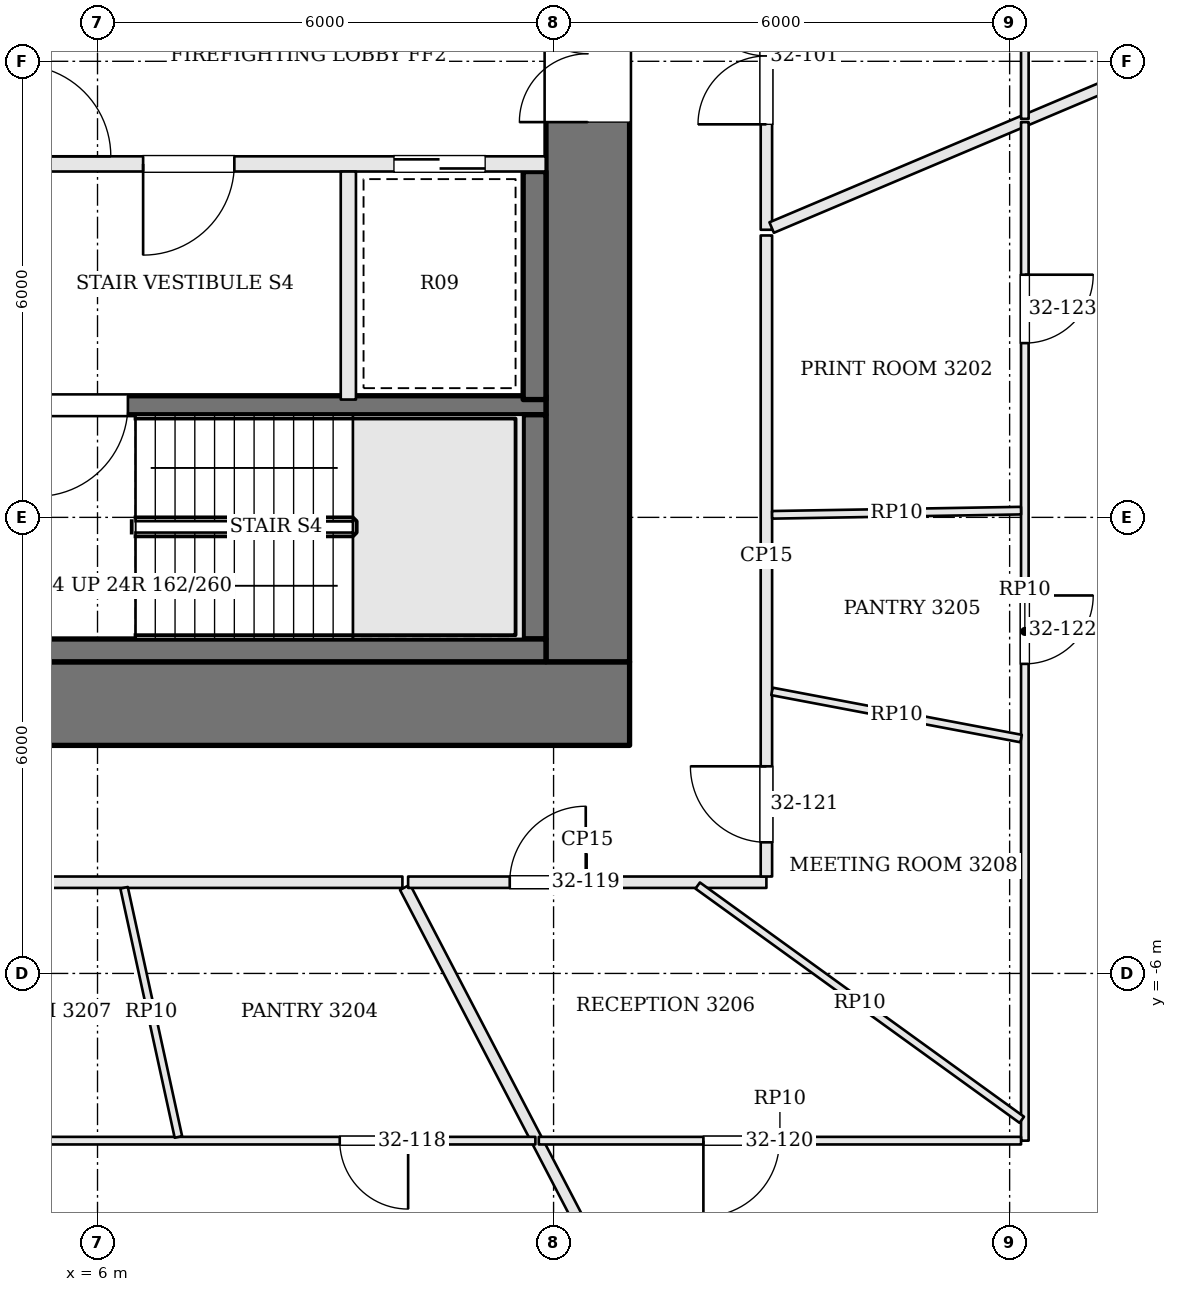
"""IFC4 building model, lengths in metres.
Left out: names, types, materials, properties, quantities, classifications, styles, units other than length and angle.
Written with IfcOpenShell. Run it as: python <this file> out.ifc"""

import sys

from ifc_helpers import new_model, si_unit, direction, frame, frame_2d, origin, place, context, subcontext, project, spatial, rectangle, extrude, element, fill, save


model = new_model("IFC4")
c1 = context("Model", 3, precision=1e-05, world=origin(), true_north=direction((0.0, 1.0)))
c2 = subcontext(c1, "Body", "Model", "MODEL_VIEW")
j1 = project(units=[si_unit("LENGTHUNIT", "METRE"), si_unit("PLANEANGLEUNIT", "RADIAN")], contexts=[c1])
p1 = place(None, origin())
s1 = spatial("IfcSite", under=j1, at=p1, CompositionType="ELEMENT")
p2 = place(p1, origin())
s2 = spatial("IfcBuilding", under=s1, at=p2, CompositionType="ELEMENT")
p3 = place(p2, frame((0.0, 0.0, 134.4)))
s3 = spatial("IfcBuildingStorey", under=s2, at=p3, CompositionType="ELEMENT", Elevation=134.4)
p4 = place(p3, frame((-13.0, -2.45, 0.0), z_axis=(0.0, 0.0, 1.0), x_axis=(1.0, 0.0, 0.0)))
e1 = element("IfcWall", 1, at=p4, inside=s3, PredefinedType="SHEAR", context=c2, shape_type="SweptSolid", body=[
    extrude(rectangle(XDim=26.0, YDim=1.1, at=frame_2d((13.0, 0.0))), origin(), (0.0, 0.0, 1.0), 3.9),
])
p5 = place(p4, frame((9.275, 0.0, 0.0)))
e2 = element("IfcOpeningElement", 2, at=p5, cuts=e1, PredefinedType="OPENING", context=c2, shape_type="SweptSolid", body=[
    extrude(rectangle(XDim=0.9, YDim=2.1, at=frame_2d((0.45, 1.05))), frame((0.0, 0.56, 0.0), z_axis=(0.0, -1.0, 0.0), x_axis=(1.0, 0.0, 0.0)), (0.0, 0.0, 1.0), 1.12),
])
p6 = place(p4, frame((11.75, 0.0, 0.0)))
e3 = element("IfcOpeningElement", 3, at=p6, cuts=e1, PredefinedType="OPENING", context=c2, shape_type="SweptSolid", body=[
    extrude(rectangle(XDim=1.0, YDim=2.1, at=frame_2d((0.5, 1.05))), frame((0.0, 0.56, 0.0), z_axis=(0.0, -1.0, 0.0), x_axis=(1.0, 0.0, 0.0)), (0.0, 0.0, 1.0), 1.12),
])
p7 = place(p4, frame((14.325, 0.0, 0.0)))
e4 = element("IfcOpeningElement", 4, at=p7, cuts=e1, PredefinedType="OPENING", context=c2, shape_type="SweptSolid", body=[
    extrude(rectangle(XDim=0.9, YDim=2.1, at=frame_2d((0.45, 1.05))), frame((0.0, 0.56, 0.0), z_axis=(0.0, -1.0, 0.0), x_axis=(1.0, 0.0, 0.0)), (0.0, 0.0, 1.0), 1.12),
])
p8 = place(p4, frame((16.7, 0.0, 0.0)))
e5 = element("IfcOpeningElement", 5, at=p8, cuts=e1, PredefinedType="OPENING", context=c2, shape_type="SweptSolid", body=[
    extrude(rectangle(XDim=0.9, YDim=2.1, at=frame_2d((0.45, 1.05))), frame((0.0, 0.56, 0.0), z_axis=(0.0, -1.0, 0.0), x_axis=(1.0, 0.0, 0.0)), (0.0, 0.0, 1.0), 1.12),
])
p9 = place(p3, frame((12.45, -1.9, 0.0), z_axis=(0.0, 0.0, 1.0), x_axis=(0.0, 1.0, 0.0)))
e6 = element("IfcWall", 6, at=p9, inside=s3, PredefinedType="SHEAR", context=c2, shape_type="SweptSolid", body=[
    extrude(rectangle(XDim=12.8, YDim=1.1, at=frame_2d((6.4, 0.0))), origin(), (0.0, 0.0, 1.0), 3.9),
])
p10 = place(p9, frame((7.1, 0.0, 0.0)))
e7 = element("IfcOpeningElement", 7, at=p10, cuts=e6, PredefinedType="OPENING", context=c2, shape_type="SweptSolid", body=[
    extrude(rectangle(XDim=1.8, YDim=2.1, at=frame_2d((0.9, 1.05))), frame((0.0, 0.56, 0.0), z_axis=(0.0, -1.0, 0.0), x_axis=(1.0, 0.0, 0.0)), (0.0, 0.0, 1.0), 1.12),
])
p11 = place(p3, frame((11.9, 4.65, 0.0), z_axis=(0.0, 0.0, 1.0), x_axis=(-1.0, 0.0, 0.0)))
e8 = element("IfcWall", 8, at=p11, inside=s3, PredefinedType="SOLIDWALL", context=c2, shape_type="SweptSolid", body=[
    extrude(rectangle(XDim=6.8, YDim=0.2, at=frame_2d((3.4, 0.0))), origin(), (0.0, 0.0, 1.0), 3.7),
])
p12 = place(p11, frame((4.1, 0.0, 0.0)))
e9 = element("IfcOpeningElement", 9, at=p12, cuts=e8, PredefinedType="OPENING", context=c2, shape_type="SweptSolid", body=[
    extrude(rectangle(XDim=1.2, YDim=2.1, at=frame_2d((0.6, 1.05))), frame((0.0, 0.11, 0.0), z_axis=(0.0, -1.0, 0.0), x_axis=(1.0, 0.0, 0.0)), (0.0, 0.0, 1.0), 0.22),
])
p13 = place(p11, frame((0.8, 0.0, 0.0)))
e10 = element("IfcOpeningElement", 10, at=p13, cuts=e8, PredefinedType="OPENING", context=c2, shape_type="SweptSolid", body=[
    extrude(rectangle(XDim=1.2, YDim=2.1, at=frame_2d((0.6, 1.05))), frame((0.0, 0.11, 0.0), z_axis=(0.0, -1.0, 0.0), x_axis=(1.0, 0.0, 0.0)), (0.0, 0.0, 1.0), 0.22),
])
p14 = place(p3, frame((11.9, 1.475, 0.0), z_axis=(0.0, 0.0, 1.0), x_axis=(-1.0, 0.0, 0.0)))
e11 = element("IfcWall", 11, at=p14, inside=s3, PredefinedType="SOLIDWALL", context=c2, shape_type="SweptSolid", body=[
    extrude(rectangle(XDim=6.8, YDim=0.25, at=frame_2d((3.4, 0.0))), origin(), (0.0, 0.0, 1.0), 3.7),
])
p15 = place(p14, frame((5.5, 0.0, 0.0)))
e12 = element("IfcOpeningElement", 12, at=p15, cuts=e11, PredefinedType="OPENING", context=c2, shape_type="SweptSolid", body=[
    extrude(rectangle(XDim=1.2, YDim=2.1, at=frame_2d((0.6, 1.05))), frame((0.0, 0.135, 0.0), z_axis=(0.0, -1.0, 0.0), x_axis=(1.0, 0.0, 0.0)), (0.0, 0.0, 1.0), 0.27),
])
p16 = place(p3, frame((9.3, 4.55, 0.0), z_axis=(0.0, 0.0, 1.0), x_axis=(0.0, -1.0, 0.0)))
e13 = element("IfcWall", 13, at=p16, inside=s3, PredefinedType="SOLIDWALL", context=c2, shape_type="SweptSolid", body=[
    extrude(rectangle(XDim=3.0, YDim=0.2, at=frame_2d((1.5, 0.0))), origin(), (0.0, 0.0, 1.0), 3.7),
])
p17 = place(p3, frame((11.75, 4.55, 0.0), z_axis=(0.0, 0.0, 1.0), x_axis=(0.0, -1.0, 0.0)))
e14 = element("IfcWall", 14, at=p17, inside=s3, PredefinedType="SOLIDWALL", context=c2, shape_type="SweptSolid", body=[
    extrude(rectangle(XDim=3.0, YDim=0.3, at=frame_2d((1.5, 0.0))), origin(), (0.0, 0.0, 1.0), 3.7),
])
p18 = place(p3, frame((11.75, 1.35, 0.0), z_axis=(0.0, 0.0, 1.0), x_axis=(0.0, -1.0, 0.0)))
e15 = element("IfcWall", 15, at=p18, inside=s3, PredefinedType="SOLIDWALL", context=c2, shape_type="SweptSolid", body=[
    extrude(rectangle(XDim=2.95, YDim=0.3, at=frame_2d((1.475, 0.0))), origin(), (0.0, 0.0, 1.0), 3.7),
])
p19 = place(p3, frame((11.9, -1.75, 0.0), z_axis=(0.0, 0.0, 1.0), x_axis=(-1.0, 0.0, 0.0)))
e16 = element("IfcWall", 16, at=p19, inside=s3, PredefinedType="SOLIDWALL", context=c2, shape_type="SweptSolid", body=[
    extrude(rectangle(XDim=6.8, YDim=0.3, at=frame_2d((3.4, 0.0))), origin(), (0.0, 0.0, 1.0), 3.7),
])
p20 = place(p3, frame((14.8, 3.784, 0.0), z_axis=(0.0, 0.0, 1.0), x_axis=(0.0, 1.0, 0.0)))
e17 = element("IfcWall", 17, at=p20, inside=s3, PredefinedType="PARTITIONING", context=c2, shape_type="SweptSolid", body=[
    extrude(rectangle(XDim=10.943, YDim=0.15, at=frame_2d((5.472, 0.0))), origin(), (0.0, 0.0, 1.0), 3.198),
])
p21 = place(p20, frame((1.387, 0.0, 0.0)))
e18 = element("IfcOpeningElement", 18, at=p21, cuts=e17, PredefinedType="OPENING", context=c2, shape_type="SweptSolid", body=[
    extrude(rectangle(XDim=1.8, YDim=2.1, at=frame_2d((0.9, 1.05))), frame((0.0, 0.085, 0.0), z_axis=(0.0, -1.0, 0.0), x_axis=(1.0, 0.0, 0.0)), (0.0, 0.0, 1.0), 0.17),
])
p22 = place(p20, frame((7.199, 0.0, 0.0)))
e19 = element("IfcOpeningElement", 19, at=p22, cuts=e17, PredefinedType="OPENING", context=c2, shape_type="SweptSolid", body=[
    extrude(rectangle(XDim=1.0, YDim=2.4, at=frame_2d((0.5, 1.2))), frame((0.0, 0.085, 0.0), z_axis=(0.0, -1.0, 0.0), x_axis=(1.0, 0.0, 0.0)), (0.0, 0.0, 1.0), 0.17),
])
p23 = place(p3, frame((25.739, 8.408, 0.0), z_axis=(0.0, 0.0, 1.0), x_axis=(-0.921062306608, -0.389415237692, 0.0)))
e20 = element("IfcWall", 20, at=p23, inside=s3, PredefinedType="PARTITIONING", context=c2, shape_type="SweptSolid", body=[
    extrude(rectangle(XDim=11.801, YDim=0.15, at=frame_2d((5.9, 0.0))), origin(), (0.0, 0.0, 1.0), 3.198),
])
p24 = place(p3, frame((-4.106, -4.8, 0.0), z_axis=(0.0, 0.0, 1.0), x_axis=(1.0, 0.0, 0.0)))
e21 = element("IfcWall", 21, at=p24, inside=s3, PredefinedType="PARTITIONING", context=c2, shape_type="SweptSolid", body=[
    extrude(rectangle(XDim=14.117, YDim=0.15, at=frame_2d((7.059, 0.0))), origin(), (0.0, 0.0, 1.0), 3.198),
])
p25 = place(p24, frame((2.396, 0.0, 0.0)))
e22 = element("IfcOpeningElement", 22, at=p25, cuts=e21, PredefinedType="OPENING", context=c2, shape_type="SweptSolid", body=[
    extrude(rectangle(XDim=1.8, YDim=2.1, at=frame_2d((0.9, 1.05))), frame((0.0, 0.085, 0.0), z_axis=(0.0, -1.0, 0.0), x_axis=(1.0, 0.0, 0.0)), (0.0, 0.0, 1.0), 0.17),
])
p26 = place(p24, frame((8.053, 0.0, 0.0)))
e23 = element("IfcOpeningElement", 23, at=p26, cuts=e21, PredefinedType="OPENING", context=c2, shape_type="SweptSolid", body=[
    extrude(rectangle(XDim=1.0, YDim=2.4, at=frame_2d((0.5, 1.2))), frame((0.0, 0.085, 0.0), z_axis=(0.0, -1.0, 0.0), x_axis=(1.0, 0.0, 0.0)), (0.0, 0.0, 1.0), 0.17),
])
p27 = place(p3, frame((15.244, -14.841, 0.0), z_axis=(0.0, 0.0, 1.0), x_axis=(-0.46213645011, 0.88680883029, 0.0)))
e24 = element("IfcWall", 24, at=p27, inside=s3, PredefinedType="PARTITIONING", context=c2, shape_type="SweptSolid", body=[
    extrude(rectangle(XDim=11.248, YDim=0.15, at=frame_2d((5.624, 0.0))), origin(), (0.0, 0.0, 1.0), 3.198),
])
p28 = place(p3, frame((10.086, -4.8, 0.0), z_axis=(0.0, 0.0, 1.0), x_axis=(1.0, 0.0, 0.0)))
e25 = element("IfcWall", 25, at=p28, inside=s3, PredefinedType="PARTITIONING", context=c2, shape_type="SweptSolid", body=[
    extrude(rectangle(XDim=4.714, YDim=0.15, at=frame_2d((2.357, 0.0))), origin(), (0.0, 0.0, 1.0), 3.198),
])
p29 = place(p28, frame((1.337, 0.0, 0.0)))
e26 = element("IfcOpeningElement", 26, at=p29, cuts=e25, PredefinedType="OPENING", context=c2, shape_type="SweptSolid", body=[
    extrude(rectangle(XDim=1.0, YDim=2.1, at=frame_2d((0.5, 1.05))), frame((0.0, 0.085, 0.0), z_axis=(0.0, -1.0, 0.0), x_axis=(1.0, 0.0, 0.0)), (0.0, 0.0, 1.0), 0.17),
])
p30 = place(p3, frame((14.8, -4.725, 0.0), z_axis=(0.0, 0.0, 1.0), x_axis=(0.0, 1.0, 0.0)))
e27 = element("IfcWall", 27, at=p30, inside=s3, PredefinedType="PARTITIONING", context=c2, shape_type="SweptSolid", body=[
    extrude(rectangle(XDim=8.434, YDim=0.15, at=frame_2d((4.217, 0.0))), origin(), (0.0, 0.0, 1.0), 3.198),
])
p31 = place(p30, frame((0.45, 0.0, 0.0)))
e28 = element("IfcOpeningElement", 28, at=p31, cuts=e27, PredefinedType="OPENING", context=c2, shape_type="SweptSolid", body=[
    extrude(rectangle(XDim=1.0, YDim=2.4, at=frame_2d((0.5, 1.2))), frame((0.0, 0.085, 0.0), z_axis=(0.0, -1.0, 0.0), x_axis=(1.0, 0.0, 0.0)), (0.0, 0.0, 1.0), 0.17),
])
p32 = place(p3, frame((18.2, 12.001, 0.0), z_axis=(0.0, 0.0, 1.0), x_axis=(0.0, -1.0, 0.0)))
e29 = element("IfcWall", 29, at=p32, inside=s3, PredefinedType="PARTITIONING", context=c2, shape_type="SweptSolid", body=[
    extrude(rectangle(XDim=6.759, YDim=0.1, at=frame_2d((3.379, 0.0))), origin(), (0.0, 0.0, 1.0), 3.184),
])
p33 = place(p32, frame((3.574, 0.0, 0.0)))
e30 = element("IfcOpeningElement", 30, at=p33, cuts=e29, PredefinedType="OPENING", context=c2, shape_type="SweptSolid", body=[
    extrude(rectangle(XDim=1.0, YDim=2.1, at=frame_2d((0.5, 1.05))), frame((0.0, 0.06, 0.0), z_axis=(0.0, -1.0, 0.0), x_axis=(1.0, 0.0, 0.0)), (0.0, 0.0, 1.0), 0.12),
])
p34 = place(p3, frame((11.76, -8.2, 0.0), z_axis=(0.0, 0.0, 1.0), x_axis=(-1.0, 0.0, 0.0)))
e31 = element("IfcWall", 31, at=p34, inside=s3, PredefinedType="PARTITIONING", context=c2, shape_type="SweptSolid", body=[
    extrude(rectangle(XDim=16.305, YDim=0.1, at=frame_2d((8.152, 0.0))), origin(), (0.0, 0.0, 1.0), 3.184),
])
p35 = place(p34, frame((11.985, 0.0, 0.0)))
e32 = element("IfcOpeningElement", 32, at=p35, cuts=e31, PredefinedType="OPENING", context=c2, shape_type="SweptSolid", body=[
    extrude(rectangle(XDim=1.0, YDim=2.1, at=frame_2d((0.5, 1.05))), frame((0.0, 0.06, 0.0), z_axis=(0.0, -1.0, 0.0), x_axis=(1.0, 0.0, 0.0)), (0.0, 0.0, 1.0), 0.12),
])
p36 = place(p34, frame((1.674, 0.0, 0.0)))
e33 = element("IfcOpeningElement", 33, at=p36, cuts=e31, PredefinedType="OPENING", context=c2, shape_type="SweptSolid", body=[
    extrude(rectangle(XDim=0.9, YDim=2.1, at=frame_2d((0.45, 1.05))), frame((0.0, 0.06, 0.0), z_axis=(0.0, -1.0, 0.0), x_axis=(1.0, 0.0, 0.0)), (0.0, 0.0, 1.0), 0.12),
])
p37 = place(p3, frame((6.35, -4.873, 0.0), z_axis=(0.0, 0.0, 1.0), x_axis=(0.213006668545, -0.977050745435, 0.0)))
e34 = element("IfcWall", 34, at=p37, inside=s3, PredefinedType="PARTITIONING", context=c2, shape_type="SweptSolid", body=[
    extrude(rectangle(XDim=3.355, YDim=0.1, at=frame_2d((1.677, 0.0))), origin(), (0.0, 0.0, 1.0), 3.184),
])
p38 = place(p3, frame((18.2, 5.199, 0.0), z_axis=(0.0, 0.0, 1.0), x_axis=(0.0, -1.0, 0.0)))
e35 = element("IfcWall", 35, at=p38, inside=s3, PredefinedType="PARTITIONING", context=c2, shape_type="SweptSolid", body=[
    extrude(rectangle(XDim=13.399, YDim=0.1, at=frame_2d((6.7, 0.0))), origin(), (0.0, 0.0, 1.0), 3.184),
])
p39 = place(p38, frame((6.227, 0.0, 0.0)))
e36 = element("IfcOpeningElement", 36, at=p39, cuts=e35, PredefinedType="OPENING", context=c2, shape_type="SweptSolid", body=[
    extrude(rectangle(XDim=0.9, YDim=2.1, at=frame_2d((0.45, 1.05))), frame((0.0, 0.06, 0.0), z_axis=(0.0, -1.0, 0.0), x_axis=(1.0, 0.0, 0.0)), (0.0, 0.0, 1.0), 0.12),
])
p40 = place(p38, frame((2.007, 0.0, 0.0)))
e37 = element("IfcOpeningElement", 37, at=p40, cuts=e35, PredefinedType="OPENING", context=c2, shape_type="SweptSolid", body=[
    extrude(rectangle(XDim=0.9, YDim=2.1, at=frame_2d((0.45, 1.05))), frame((0.0, 0.06, 0.0), z_axis=(0.0, -1.0, 0.0), x_axis=(1.0, 0.0, 0.0)), (0.0, 0.0, 1.0), 0.12),
])
p41 = place(p3, frame((18.15, -8.2, 0.0), z_axis=(0.0, 0.0, 1.0), x_axis=(-1.0, 0.0, 0.0)))
e38 = element("IfcWall", 38, at=p41, inside=s3, PredefinedType="PARTITIONING", context=c2, shape_type="SweptSolid", body=[
    extrude(rectangle(XDim=6.344, YDim=0.1, at=frame_2d((3.172, 0.0))), origin(), (0.0, 0.0, 1.0), 3.184),
])
p42 = place(p41, frame((3.179, 0.0, 0.0)))
e39 = element("IfcOpeningElement", 39, at=p42, cuts=e38, PredefinedType="OPENING", context=c2, shape_type="SweptSolid", body=[
    extrude(rectangle(XDim=1.0, YDim=2.1, at=frame_2d((0.5, 1.05))), frame((0.0, 0.06, 0.0), z_axis=(0.0, -1.0, 0.0), x_axis=(1.0, 0.0, 0.0)), (0.0, 0.0, 1.0), 0.12),
])
p43 = place(p3, frame((13.896, -4.844, 0.0), z_axis=(0.0, 0.0, 1.0), x_axis=(0.810468668719, -0.585781987624, 0.0)))
e40 = element("IfcWall", 40, at=p43, inside=s3, PredefinedType="PARTITIONING", context=c2, shape_type="SweptSolid", body=[
    extrude(rectangle(XDim=5.26, YDim=0.1, at=frame_2d((2.63, 0.0))), origin(), (0.0, 0.0, 1.0), 3.184),
])
p44 = place(p3, frame((14.874, -2.29, 0.0), z_axis=(0.0, 0.0, 1.0), x_axis=(0.982563379302, -0.185927958238, 0.0)))
e41 = element("IfcWall", 41, at=p44, inside=s3, PredefinedType="PARTITIONING", context=c2, shape_type="SweptSolid", body=[
    extrude(rectangle(XDim=3.335, YDim=0.1, at=frame_2d((1.667, 0.0))), origin(), (0.0, 0.0, 1.0), 3.184),
])
p45 = place(p3, frame((14.875, 0.033, 0.0), z_axis=(0.0, 0.0, 1.0), x_axis=(0.999856843244, 0.016920195573, 0.0)))
e42 = element("IfcWall", 42, at=p45, inside=s3, PredefinedType="PARTITIONING", context=c2, shape_type="SweptSolid", body=[
    extrude(rectangle(XDim=3.275, YDim=0.1, at=frame_2d((1.638, 0.0))), origin(), (0.0, 0.0, 1.0), 3.184),
])
p46 = place(p10, origin())
e43 = element("IfcDoor", 43, at=p46, inside=s3, OperationType="DOUBLE_DOOR_SINGLE_SWING", PredefinedType="DOOR", context=c2, shape_type="SweptSolid", body=[
    extrude(rectangle(XDim=1.8, YDim=2.1, at=frame_2d((0.9, 1.05))), frame((0.0, 0.025, 0.0), z_axis=(0.0, -1.0, 0.0), x_axis=(1.0, 0.0, 0.0)), (0.0, 0.0, 1.0), 0.05),
])
fill(e7, e43)
p47 = place(p12, origin())
e44 = element("IfcDoor", 44, at=p47, inside=s3, OperationType="SINGLE_SWING_RIGHT", PredefinedType="DOOR", context=c2, shape_type="SweptSolid", body=[
    extrude(rectangle(XDim=1.2, YDim=2.1, at=frame_2d((0.6, 1.05))), frame((0.0, 0.025, 0.0), z_axis=(0.0, -1.0, 0.0), x_axis=(1.0, 0.0, 0.0)), (0.0, 0.0, 1.0), 0.05),
])
fill(e9, e44)
p48 = place(p15, origin())
e45 = element("IfcDoor", 45, at=p48, inside=s3, OperationType="SINGLE_SWING_RIGHT", PredefinedType="DOOR", context=c2, shape_type="SweptSolid", body=[
    extrude(rectangle(XDim=1.2, YDim=2.1, at=frame_2d((0.6, 1.05))), frame((0.0, 0.025, 0.0), z_axis=(0.0, -1.0, 0.0), x_axis=(1.0, 0.0, 0.0)), (0.0, 0.0, 1.0), 0.05),
])
fill(e12, e45)
p49 = place(p13, origin())
e46 = element("IfcDoor", 46, at=p49, inside=s3, OperationType="SLIDING_TO_RIGHT", PredefinedType="DOOR", context=c2, shape_type="SweptSolid", body=[
    extrude(rectangle(XDim=1.2, YDim=2.1, at=frame_2d((0.6, 1.05))), frame((0.0, 0.025, 0.0), z_axis=(0.0, -1.0, 0.0), x_axis=(1.0, 0.0, 0.0)), (0.0, 0.0, 1.0), 0.05),
])
fill(e10, e46)
p50 = place(p21, origin())
e47 = element("IfcDoor", 47, at=p50, inside=s3, OperationType="DOUBLE_DOOR_SINGLE_SWING", PredefinedType="DOOR", context=c2, shape_type="SweptSolid", body=[
    extrude(rectangle(XDim=1.8, YDim=2.1, at=frame_2d((0.9, 1.05))), frame((0.0, 0.025, 0.0), z_axis=(0.0, -1.0, 0.0), x_axis=(1.0, 0.0, 0.0)), (0.0, 0.0, 1.0), 0.05),
])
fill(e18, e47)
p51 = place(p36, origin())
e48 = element("IfcDoor", 48, at=p51, inside=s3, OperationType="SINGLE_SWING_LEFT", PredefinedType="DOOR", context=c2, shape_type="SweptSolid", body=[
    extrude(rectangle(XDim=0.9, YDim=2.1, at=frame_2d((0.45, 1.05))), frame((0.0, 0.025, 0.0), z_axis=(0.0, -1.0, 0.0), x_axis=(1.0, 0.0, 0.0)), (0.0, 0.0, 1.0), 0.05),
])
fill(e33, e48)
p52 = place(p29, origin())
e49 = element("IfcDoor", 49, at=p52, inside=s3, OperationType="SINGLE_SWING_RIGHT", PredefinedType="DOOR", context=c2, shape_type="SweptSolid", body=[
    extrude(rectangle(XDim=1.0, YDim=2.1, at=frame_2d((0.5, 1.05))), frame((0.0, 0.025, 0.0), z_axis=(0.0, -1.0, 0.0), x_axis=(1.0, 0.0, 0.0)), (0.0, 0.0, 1.0), 0.05),
])
fill(e26, e49)
p53 = place(p42, origin())
e50 = element("IfcDoor", 50, at=p53, inside=s3, OperationType="SINGLE_SWING_RIGHT", PredefinedType="DOOR", context=c2, shape_type="SweptSolid", body=[
    extrude(rectangle(XDim=1.0, YDim=2.1, at=frame_2d((0.5, 1.05))), frame((0.0, 0.025, 0.0), z_axis=(0.0, -1.0, 0.0), x_axis=(1.0, 0.0, 0.0)), (0.0, 0.0, 1.0), 0.05),
])
fill(e39, e50)
p54 = place(p31, origin())
e51 = element("IfcDoor", 51, at=p54, inside=s3, OperationType="SINGLE_SWING_RIGHT", PredefinedType="DOOR", context=c2, shape_type="SweptSolid", body=[
    extrude(rectangle(XDim=1.0, YDim=2.4, at=frame_2d((0.5, 1.2))), frame((0.0, 0.025, 0.0), z_axis=(0.0, -1.0, 0.0), x_axis=(1.0, 0.0, 0.0)), (0.0, 0.0, 1.0), 0.05),
])
fill(e28, e51)
p55 = place(p39, origin())
e52 = element("IfcDoor", 52, at=p55, inside=s3, OperationType="SINGLE_SWING_LEFT", PredefinedType="DOOR", context=c2, shape_type="SweptSolid", body=[
    extrude(rectangle(XDim=0.9, YDim=2.1, at=frame_2d((0.45, 1.05))), frame((0.0, 0.025, 0.0), z_axis=(0.0, -1.0, 0.0), x_axis=(1.0, 0.0, 0.0)), (0.0, 0.0, 1.0), 0.05),
])
fill(e36, e52)
p56 = place(p40, origin())
e53 = element("IfcDoor", 53, at=p56, inside=s3, OperationType="SINGLE_SWING_LEFT", PredefinedType="DOOR", context=c2, shape_type="SweptSolid", body=[
    extrude(rectangle(XDim=0.9, YDim=2.1, at=frame_2d((0.45, 1.05))), frame((0.0, 0.025, 0.0), z_axis=(0.0, -1.0, 0.0), x_axis=(1.0, 0.0, 0.0)), (0.0, 0.0, 1.0), 0.05),
])
fill(e37, e53)
save(model, sys.argv[1])
